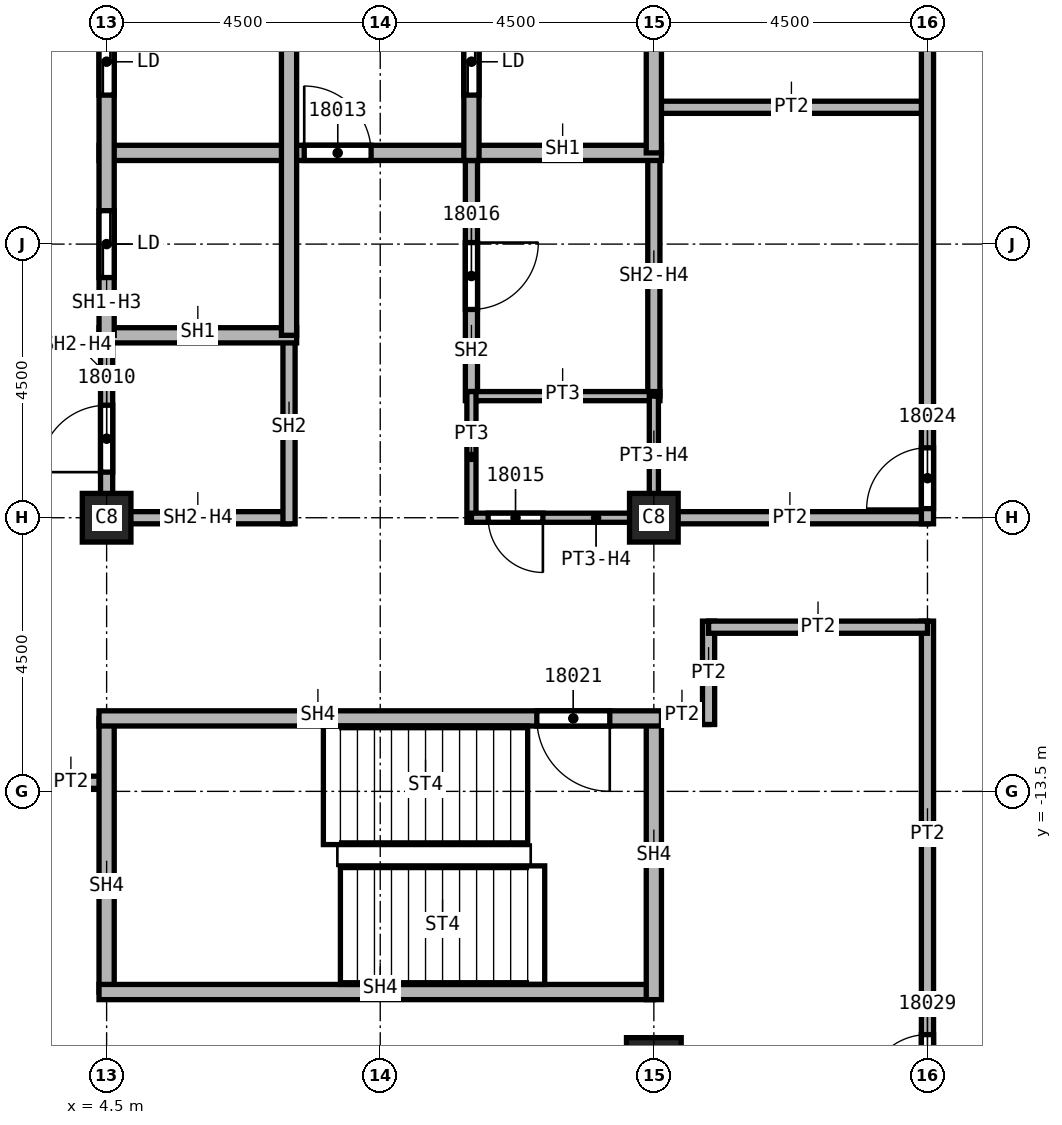
"""IFC4 building model, lengths in metres.
Left out: names, types, materials, properties, quantities, classifications, styles, units other than length and angle.
Written with IfcOpenShell. Run it as: python <this file> out.ifc"""

import sys

from ifc_helpers import new_model, si_unit, direction, frame, frame_2d, origin, origin_2d, place, context, subcontext, project, spatial, rectangle, extrude, element, fill, save


model = new_model("IFC4")
c1 = context("Model", 3, precision=1e-05, world=origin(), true_north=direction((0.0, 1.0)))
c2 = subcontext(c1, "Body", "Model", "MODEL_VIEW")
j1 = project(units=[si_unit("LENGTHUNIT", "METRE"), si_unit("PLANEANGLEUNIT", "RADIAN")], contexts=[c1])
p1 = place(None, origin())
s1 = spatial("IfcSite", under=j1, at=p1, CompositionType="ELEMENT")
p2 = place(p1, origin())
s2 = spatial("IfcBuilding", under=s1, at=p2, CompositionType="ELEMENT")
p3 = place(p2, frame((0.0, 0.0, 266.0)))
s3 = spatial("IfcBuildingStorey", under=s2, at=p3, CompositionType="ELEMENT", Elevation=266.0)
p4 = place(p3, frame((13.5, -18.0, 0.0), z_axis=(0.0, 0.0, 1.0), x_axis=(1.0, 0.0, 0.0)))
e1 = element("IfcColumn", 1, at=p4, inside=s3, PredefinedType="COLUMN", context=c2, shape_type="SweptSolid", body=[
    extrude(rectangle(XDim=0.9, YDim=0.9, at=origin_2d()), origin(), (0.0, 0.0, 1.0), 3.72),
])
for number, where, z_axis, x_axis in (
    (2, (4.5, -9.0, 0.0), (0.0, 0.0, 1.0), (1.0, 0.0, 0.0)),
    (3, (13.5, -9.0, 0.0), (0.0, 0.0, 1.0), (1.0, 0.0, 0.0)),
):
    element("IfcColumn", number, at=place(p3, frame(where, z_axis=z_axis, x_axis=x_axis)), inside=s3, PredefinedType="COLUMN", context=c2, shape_type="SweptSolid", body=[
        extrude(rectangle(XDim=0.8, YDim=0.8, at=origin_2d()), origin(), (0.0, 0.0, 1.0), 3.72),
    ])
p5 = place(p3, frame((4.5, -13.35, 0.0), z_axis=(0.0, 0.0, 1.0), x_axis=(-1.0, 0.0, 0.0)))
e4 = element("IfcWall", 4, at=p5, inside=s3, PredefinedType="PARTITIONING", context=c2, shape_type="SweptSolid", body=[
    extrude(rectangle(XDim=1.05, YDim=0.2, at=frame_2d((0.525, 0.0))), origin(), (0.0, 0.0, 1.0), 3.72),
])
for number, where, z_axis, x_axis in (
    (5, (13.5, -9.0, 0.0), (0.0, 0.0, 1.0), (1.0, 0.0, 0.0)),
    (6, (13.5, -2.25, 0.0), (0.0, 0.0, 1.0), (1.0, 0.0, 0.0)),
):
    element("IfcWall", number, at=place(p3, frame(where, z_axis=z_axis, x_axis=x_axis)), inside=s3, PredefinedType="PARTITIONING", context=c2, shape_type="SweptSolid", body=[
        extrude(rectangle(XDim=4.5, YDim=0.2, at=frame_2d((2.25, 0.0))), origin(), (0.0, 0.0, 1.0), 3.72),
    ])
p6 = place(p3, frame((14.4, -12.3, 0.0), z_axis=(0.0, 0.0, 1.0), x_axis=(-1.0, 0.0, 0.0)))
e7 = element("IfcWall", 7, at=p6, inside=s3, PredefinedType="PARTITIONING", context=c2, shape_type="SweptSolid", body=[
    extrude(rectangle(XDim=1.025, YDim=0.2, at=frame_2d((0.512, 0.0))), origin(), (0.0, 0.0, 1.0), 3.72),
])
p7 = place(p3, frame((14.4, -10.7, 0.0), z_axis=(0.0, 0.0, 1.0), x_axis=(0.0, -1.0, 0.0)))
e8 = element("IfcWall", 8, at=p7, inside=s3, PredefinedType="PARTITIONING", context=c2, shape_type="SweptSolid", body=[
    extrude(rectangle(XDim=1.7, YDim=0.2, at=frame_2d((0.85, 0.0))), origin(), (0.0, 0.0, 1.0), 3.72),
])
p8 = place(p3, frame((18.0, -21.9, 0.0), z_axis=(0.0, 0.0, 1.0), x_axis=(0.0, 1.0, 0.0)))
e9 = element("IfcWall", 9, at=p8, inside=s3, PredefinedType="PARTITIONING", context=c2, shape_type="SweptSolid", body=[
    extrude(rectangle(XDim=11.2, YDim=0.2, at=frame_2d((5.6, 0.0))), origin(), (0.0, 0.0, 1.0), 3.72),
])
p9 = place(p8, frame((3.4, 0.0, 0.0)))
e10 = element("IfcOpeningElement", 10, at=p9, cuts=e9, PredefinedType="OPENING", context=c2, shape_type="SweptSolid", body=[
    extrude(rectangle(XDim=1.0, YDim=2.1, at=frame_2d((0.5, 1.05))), frame((0.0, 0.1, 0.0), z_axis=(0.0, -1.0, 0.0), x_axis=(1.0, 0.0, 0.0)), (0.0, 0.0, 1.0), 0.2),
])
p10 = place(p3, frame((18.0, -10.8, 0.0), z_axis=(0.0, 0.0, 1.0), x_axis=(-1.0, 0.0, 0.0)))
e11 = element("IfcWall", 11, at=p10, inside=s3, PredefinedType="PARTITIONING", context=c2, shape_type="SweptSolid", body=[
    extrude(rectangle(XDim=3.6, YDim=0.2, at=frame_2d((1.8, 0.0))), origin(), (0.0, 0.0, 1.0), 3.72),
])
p11 = place(p3, frame((18.0, -9.1, 0.0), z_axis=(0.0, 0.0, 1.0), x_axis=(0.0, 1.0, 0.0)))
e12 = element("IfcWall", 12, at=p11, inside=s3, PredefinedType="PARTITIONING", context=c2, shape_type="SweptSolid", body=[
    extrude(rectangle(XDim=18.2, YDim=0.2, at=frame_2d((9.1, 0.0))), origin(), (0.0, 0.0, 1.0), 3.72),
])
p12 = place(p11, frame((0.25, 0.0, 0.0)))
e13 = element("IfcOpeningElement", 13, at=p12, cuts=e12, PredefinedType="OPENING", context=c2, shape_type="SweptSolid", body=[
    extrude(rectangle(XDim=1.0, YDim=2.1, at=frame_2d((0.5, 1.05))), frame((0.0, 0.1, 0.0), z_axis=(0.0, -1.0, 0.0), x_axis=(1.0, 0.0, 0.0)), (0.0, 0.0, 1.0), 0.2),
])
p13 = place(p11, frame((14.65, 0.0, 0.0)))
e14 = element("IfcOpeningElement", 14, at=p13, cuts=e12, PredefinedType="OPENING", context=c2, shape_type="SweptSolid", body=[
    extrude(rectangle(XDim=1.0, YDim=2.1, at=frame_2d((0.5, 1.05))), frame((0.0, 0.1, 0.0), z_axis=(0.0, -1.0, 0.0), x_axis=(1.0, 0.0, 0.0)), (0.0, 0.0, 1.0), 0.2),
])
p14 = place(p3, frame((4.5, -9.1, 0.0), z_axis=(0.0, 0.0, 1.0), x_axis=(0.0, 1.0, 0.0)))
e15 = element("IfcWall", 15, at=p14, inside=s3, PredefinedType="SOLIDWALL", context=c2, shape_type="SweptSolid", body=[
    extrude(rectangle(XDim=3.1, YDim=0.2, at=frame_2d((1.55, 0.0))), origin(), (0.0, 0.0, 1.0), 3.042),
])
p15 = place(p14, frame((0.85, 0.0, 0.0)))
e16 = element("IfcOpeningElement", 16, at=p15, cuts=e15, PredefinedType="OPENING", context=c2, shape_type="SweptSolid", body=[
    extrude(rectangle(XDim=1.1, YDim=2.1, at=frame_2d((0.55, 1.05))), frame((0.0, 0.1, 0.0), z_axis=(0.0, -1.0, 0.0), x_axis=(1.0, 0.0, 0.0)), (0.0, 0.0, 1.0), 0.2),
])
p16 = place(p3, frame((7.5, -9.0, 0.0), z_axis=(0.0, 0.0, 1.0), x_axis=(-1.0, 0.0, 0.0)))
e17 = element("IfcWall", 17, at=p16, inside=s3, PredefinedType="SOLIDWALL", context=c2, shape_type="SweptSolid", body=[
    extrude(rectangle(XDim=3.0, YDim=0.2, at=frame_2d((1.5, 0.0))), origin(), (0.0, 0.0, 1.0), 3.042),
])
p17 = place(p3, frame((7.5, -6.0, 0.0), z_axis=(0.0, 0.0, 1.0), x_axis=(0.0, -1.0, 0.0)))
e18 = element("IfcWall", 18, at=p17, inside=s3, PredefinedType="SOLIDWALL", context=c2, shape_type="SweptSolid", body=[
    extrude(rectangle(XDim=3.1, YDim=0.2, at=frame_2d((1.55, 0.0))), origin(), (0.0, 0.0, 1.0), 3.72),
])
p18 = place(p3, frame((10.5, -2.875, 0.0), z_axis=(0.0, 0.0, 1.0), x_axis=(0.0, -1.0, 0.0)))
e19 = element("IfcWall", 19, at=p18, inside=s3, PredefinedType="SOLIDWALL", context=c2, shape_type="SweptSolid", body=[
    extrude(rectangle(XDim=4.2, YDim=0.2, at=frame_2d((2.1, 0.0))), origin(), (0.0, 0.0, 1.0), 3.72),
])
p19 = place(p18, frame((1.6, 0.0, 0.0)))
e20 = element("IfcOpeningElement", 20, at=p19, cuts=e19, PredefinedType="OPENING", context=c2, shape_type="SweptSolid", body=[
    extrude(rectangle(XDim=1.1, YDim=2.1, at=frame_2d((0.55, 1.05))), frame((0.0, 0.1, 0.0), z_axis=(0.0, -1.0, 0.0), x_axis=(1.0, 0.0, 0.0)), (0.0, 0.0, 1.0), 0.2),
])
p20 = place(p3, frame((13.5, -3.0, 0.0), z_axis=(0.0, 0.0, 1.0), x_axis=(0.0, -1.0, 0.0)))
e21 = element("IfcWall", 21, at=p20, inside=s3, PredefinedType="SOLIDWALL", context=c2, shape_type="SweptSolid", body=[
    extrude(rectangle(XDim=4.0, YDim=0.2, at=frame_2d((2.0, 0.0))), origin(), (0.0, 0.0, 1.0), 3.042),
])
p21 = place(p3, frame((4.375, -6.0, 0.0), z_axis=(0.0, 0.0, 1.0), x_axis=(1.0, 0.0, 0.0)))
e22 = element("IfcWall", 22, at=p21, inside=s3, PredefinedType="SOLIDWALL", context=c2, shape_type="SweptSolid", body=[
    extrude(rectangle(XDim=3.25, YDim=0.25, at=frame_2d((1.625, 0.0))), origin(), (0.0, 0.0, 1.0), 3.72),
])
p22 = place(p3, frame((4.375, -3.0, 0.0), z_axis=(0.0, 0.0, 1.0), x_axis=(1.0, 0.0, 0.0)))
e23 = element("IfcWall", 23, at=p22, inside=s3, PredefinedType="SOLIDWALL", context=c2, shape_type="SweptSolid", body=[
    extrude(rectangle(XDim=9.25, YDim=0.25, at=frame_2d((4.625, 0.0))), origin(), (0.0, 0.0, 1.0), 3.72),
])
p23 = place(p22, frame((3.375, 0.0, 0.0)))
e24 = element("IfcOpeningElement", 24, at=p23, cuts=e23, PredefinedType="OPENING", context=c2, shape_type="SweptSolid", body=[
    extrude(rectangle(XDim=1.1, YDim=2.1, at=frame_2d((0.55, 1.05))), frame((0.0, 0.125, 0.0), z_axis=(0.0, -1.0, 0.0), x_axis=(1.0, 0.0, 0.0)), (0.0, 0.0, 1.0), 0.25),
])
p24 = place(p3, frame((4.5, -6.0, 0.0), z_axis=(0.0, 0.0, 1.0), x_axis=(0.0, 1.0, 0.0)))
e25 = element("IfcWall", 25, at=p24, inside=s3, PredefinedType="SOLIDWALL", context=c2, shape_type="SweptSolid", body=[
    extrude(rectangle(XDim=6.0, YDim=0.25, at=frame_2d((3.0, 0.0))), origin(), (0.0, 0.0, 1.0), 3.042),
])
p25 = place(p24, frame((0.95, 0.0, 0.0)))
e26 = element("IfcOpeningElement", 26, at=p25, cuts=e25, PredefinedType="OPENING", context=c2, shape_type="SweptSolid", body=[
    extrude(rectangle(XDim=1.1, YDim=2.1, at=frame_2d((0.55, 1.05))), frame((0.0, 0.125, 0.0), z_axis=(0.0, -1.0, 0.0), x_axis=(1.0, 0.0, 0.0)), (0.0, 0.0, 1.0), 0.25),
])
p26 = place(p24, frame((3.95, 0.0, 0.0)))
e27 = element("IfcOpeningElement", 27, at=p26, cuts=e25, PredefinedType="OPENING", context=c2, shape_type="SweptSolid", body=[
    extrude(rectangle(XDim=1.1, YDim=2.1, at=frame_2d((0.55, 1.05))), frame((0.0, 0.125, 0.0), z_axis=(0.0, -1.0, 0.0), x_axis=(1.0, 0.0, 0.0)), (0.0, 0.0, 1.0), 0.25),
])
p27 = place(p3, frame((7.5, 3.125, 0.0), z_axis=(0.0, 0.0, 1.0), x_axis=(0.0, -1.0, 0.0)))
e28 = element("IfcWall", 28, at=p27, inside=s3, PredefinedType="SOLIDWALL", context=c2, shape_type="SweptSolid", body=[
    extrude(rectangle(XDim=9.125, YDim=0.25, at=frame_2d((4.562, 0.0))), origin(), (0.0, 0.0, 1.0), 3.72),
])
p28 = place(p3, frame((10.5, 6.125, 0.0), z_axis=(0.0, 0.0, 1.0), x_axis=(0.0, -1.0, 0.0)))
e29 = element("IfcWall", 29, at=p28, inside=s3, PredefinedType="SOLIDWALL", context=c2, shape_type="SweptSolid", body=[
    extrude(rectangle(XDim=9.25, YDim=0.25, at=frame_2d((4.625, 0.0))), origin(), (0.0, 0.0, 1.0), 3.72),
])
p29 = place(p28, frame((7.075, 0.0, 0.0)))
e30 = element("IfcOpeningElement", 30, at=p29, cuts=e29, PredefinedType="OPENING", context=c2, shape_type="SweptSolid", body=[
    extrude(rectangle(XDim=1.1, YDim=2.1, at=frame_2d((0.55, 1.05))), frame((0.0, 0.125, 0.0), z_axis=(0.0, -1.0, 0.0), x_axis=(1.0, 0.0, 0.0)), (0.0, 0.0, 1.0), 0.25),
])
p30 = place(p28, frame((4.075, 0.0, 0.0)))
e31 = element("IfcOpeningElement", 31, at=p30, cuts=e29, PredefinedType="OPENING", context=c2, shape_type="SweptSolid", body=[
    extrude(rectangle(XDim=1.1, YDim=2.1, at=frame_2d((0.55, 1.05))), frame((0.0, 0.125, 0.0), z_axis=(0.0, -1.0, 0.0), x_axis=(1.0, 0.0, 0.0)), (0.0, 0.0, 1.0), 0.25),
])
p31 = place(p3, frame((13.5, 6.0, 0.0), z_axis=(0.0, 0.0, 1.0), x_axis=(0.0, -1.0, 0.0)))
e32 = element("IfcWall", 32, at=p31, inside=s3, PredefinedType="SOLIDWALL", context=c2, shape_type="SweptSolid", body=[
    extrude(rectangle(XDim=9.0, YDim=0.25, at=frame_2d((4.5, 0.0))), origin(), (0.0, 0.0, 1.0), 3.042),
])
p32 = place(p3, frame((4.5, -16.8, 0.0), z_axis=(0.0, 0.0, 1.0), x_axis=(0.0, 1.0, 0.0)))
e33 = element("IfcWall", 33, at=p32, inside=s3, PredefinedType="SOLIDWALL", context=c2, shape_type="SweptSolid", body=[
    extrude(rectangle(XDim=4.5, YDim=0.25, at=frame_2d((2.25, 0.0))), origin(), (0.0, 0.0, 1.0), 3.72),
])
p33 = place(p3, frame((13.5, -16.8, 0.0), z_axis=(0.0, 0.0, 1.0), x_axis=(-1.0, 0.0, 0.0)))
e34 = element("IfcWall", 34, at=p33, inside=s3, PredefinedType="SOLIDWALL", context=c2, shape_type="SweptSolid", body=[
    extrude(rectangle(XDim=9.125, YDim=0.25, at=frame_2d((4.562, 0.0))), origin(), (0.0, 0.0, 1.0), 3.72),
])
p34 = place(p3, frame((13.5, -12.3, 0.0), z_axis=(0.0, 0.0, 1.0), x_axis=(0.0, -1.0, 0.0)))
e35 = element("IfcWall", 35, at=p34, inside=s3, PredefinedType="SOLIDWALL", context=c2, shape_type="SweptSolid", body=[
    extrude(rectangle(XDim=4.625, YDim=0.25, at=frame_2d((2.312, 0.0))), origin(), (0.0, 0.0, 1.0), 3.72),
])
p35 = place(p3, frame((13.625, -12.3, 0.0), z_axis=(0.0, 0.0, 1.0), x_axis=(-1.0, 0.0, 0.0)))
e36 = element("IfcWall", 36, at=p35, inside=s3, PredefinedType="SOLIDWALL", context=c2, shape_type="SweptSolid", body=[
    extrude(rectangle(XDim=9.25, YDim=0.25, at=frame_2d((4.625, 0.0))), origin(), (0.0, 0.0, 1.0), 3.72),
])
p36 = place(p35, frame((0.85, 0.0, 0.0)))
e37 = element("IfcOpeningElement", 37, at=p36, cuts=e36, PredefinedType="OPENING", context=c2, shape_type="SweptSolid", body=[
    extrude(rectangle(XDim=1.2, YDim=2.1, at=frame_2d((0.6, 1.05))), frame((0.0, 0.125, 0.0), z_axis=(0.0, -1.0, 0.0), x_axis=(1.0, 0.0, 0.0)), (0.0, 0.0, 1.0), 0.25),
])
p37 = place(p3, frame((10.5, -7.0, 0.0), z_axis=(0.0, 0.0, 1.0), x_axis=(1.0, 0.0, 0.0)))
e38 = element("IfcWall", 38, at=p37, inside=s3, PredefinedType="PARTITIONING", context=c2, shape_type="SweptSolid", body=[
    extrude(rectangle(XDim=3.1, YDim=0.15, at=frame_2d((1.55, 0.0))), origin(), (0.0, 0.0, 1.0), 3.72),
])
p38 = place(p3, frame((10.5, -6.925, 0.0), z_axis=(0.0, 0.0, 1.0), x_axis=(0.0, -1.0, 0.0)))
e39 = element("IfcWall", 39, at=p38, inside=s3, PredefinedType="PARTITIONING", context=c2, shape_type="SweptSolid", body=[
    extrude(rectangle(XDim=2.15, YDim=0.15, at=frame_2d((1.075, 0.0))), origin(), (0.0, 0.0, 1.0), 3.72),
])
p39 = place(p3, frame((13.5, -7.0, 0.0), z_axis=(0.0, 0.0, 1.0), x_axis=(0.0, -1.0, 0.0)))
e40 = element("IfcWall", 40, at=p39, inside=s3, PredefinedType="PARTITIONING", context=c2, shape_type="SweptSolid", body=[
    extrude(rectangle(XDim=2.1, YDim=0.15, at=frame_2d((1.05, 0.0))), origin(), (0.0, 0.0, 1.0), 3.042),
])
p40 = place(p3, frame((13.575, -9.0, 0.0), z_axis=(0.0, 0.0, 1.0), x_axis=(-1.0, 0.0, 0.0)))
e41 = element("IfcWall", 41, at=p40, inside=s3, PredefinedType="PARTITIONING", context=c2, shape_type="SweptSolid", body=[
    extrude(rectangle(XDim=3.075, YDim=0.15, at=frame_2d((1.538, 0.0))), origin(), (0.0, 0.0, 1.0), 3.042),
])
p41 = place(p40, frame((1.9, 0.0, 0.0)))
e42 = element("IfcOpeningElement", 42, at=p41, cuts=e41, PredefinedType="OPENING", context=c2, shape_type="SweptSolid", body=[
    extrude(rectangle(XDim=0.9, YDim=2.1, at=frame_2d((0.45, 1.05))), frame((0.0, 0.075, 0.0), z_axis=(0.0, -1.0, 0.0), x_axis=(1.0, 0.0, 0.0)), (0.0, 0.0, 1.0), 0.15),
])
p42 = place(p15, origin())
e43 = element("IfcDoor", 43, at=p42, inside=s3, OperationType="SINGLE_SWING_LEFT", PredefinedType="DOOR", context=c2, shape_type="SweptSolid", body=[
    extrude(rectangle(XDim=1.1, YDim=2.1, at=frame_2d((0.55, 1.05))), frame((0.0, 0.025, 0.0), z_axis=(0.0, -1.0, 0.0), x_axis=(1.0, 0.0, 0.0)), (0.0, 0.0, 1.0), 0.05),
])
fill(e16, e43)
p43 = place(p23, origin())
e44 = element("IfcDoor", 44, at=p43, inside=s3, OperationType="SINGLE_SWING_RIGHT", PredefinedType="DOOR", context=c2, shape_type="SweptSolid", body=[
    extrude(rectangle(XDim=1.1, YDim=2.1, at=frame_2d((0.55, 1.05))), frame((0.0, 0.025, 0.0), z_axis=(0.0, -1.0, 0.0), x_axis=(1.0, 0.0, 0.0)), (0.0, 0.0, 1.0), 0.05),
])
fill(e24, e44)
p44 = place(p41, origin())
e45 = element("IfcDoor", 45, at=p44, inside=s3, OperationType="SINGLE_SWING_RIGHT", PredefinedType="DOOR", context=c2, shape_type="SweptSolid", body=[
    extrude(rectangle(XDim=0.9, YDim=2.1, at=frame_2d((0.45, 1.05))), frame((0.0, 0.025, 0.0), z_axis=(0.0, -1.0, 0.0), x_axis=(1.0, 0.0, 0.0)), (0.0, 0.0, 1.0), 0.05),
])
fill(e42, e45)
p45 = place(p19, origin())
e46 = element("IfcDoor", 46, at=p45, inside=s3, OperationType="SINGLE_SWING_LEFT", PredefinedType="DOOR", context=c2, shape_type="SweptSolid", body=[
    extrude(rectangle(XDim=1.1, YDim=2.1, at=frame_2d((0.55, 1.05))), frame((0.0, 0.025, 0.0), z_axis=(0.0, -1.0, 0.0), x_axis=(1.0, 0.0, 0.0)), (0.0, 0.0, 1.0), 0.05),
])
fill(e20, e46)
p46 = place(p36, origin())
e47 = element("IfcDoor", 47, at=p46, inside=s3, OperationType="SINGLE_SWING_RIGHT", PredefinedType="DOOR", context=c2, shape_type="SweptSolid", body=[
    extrude(rectangle(XDim=1.2, YDim=2.1, at=frame_2d((0.6, 1.05))), frame((0.0, 0.025, 0.0), z_axis=(0.0, -1.0, 0.0), x_axis=(1.0, 0.0, 0.0)), (0.0, 0.0, 1.0), 0.05),
])
fill(e37, e47)
p47 = place(p12, origin())
e48 = element("IfcDoor", 48, at=p47, inside=s3, OperationType="SINGLE_SWING_LEFT", PredefinedType="DOOR", context=c2, shape_type="SweptSolid", body=[
    extrude(rectangle(XDim=1.0, YDim=2.1, at=frame_2d((0.5, 1.05))), frame((0.0, 0.025, 0.0), z_axis=(0.0, -1.0, 0.0), x_axis=(1.0, 0.0, 0.0)), (0.0, 0.0, 1.0), 0.05),
])
fill(e13, e48)
p48 = place(p9, origin())
e49 = element("IfcDoor", 49, at=p48, inside=s3, OperationType="SINGLE_SWING_RIGHT", PredefinedType="DOOR", context=c2, shape_type="SweptSolid", body=[
    extrude(rectangle(XDim=1.0, YDim=2.1, at=frame_2d((0.5, 1.05))), frame((0.0, 0.025, 0.0), z_axis=(0.0, -1.0, 0.0), x_axis=(1.0, 0.0, 0.0)), (0.0, 0.0, 1.0), 0.05),
])
fill(e10, e49)
p49 = place(p25, origin())
e50 = element("IfcDoor", 50, at=p49, inside=s3, OperationType="SLIDING_TO_LEFT", PredefinedType="DOOR", context=c2, shape_type="SweptSolid", body=[
    extrude(rectangle(XDim=1.1, YDim=2.1, at=frame_2d((0.55, 1.05))), frame((0.0, 0.025, 0.0), z_axis=(0.0, -1.0, 0.0), x_axis=(1.0, 0.0, 0.0)), (0.0, 0.0, 1.0), 0.05),
])
fill(e26, e50)
p50 = place(p26, origin())
e51 = element("IfcDoor", 51, at=p50, inside=s3, OperationType="SLIDING_TO_LEFT", PredefinedType="DOOR", context=c2, shape_type="SweptSolid", body=[
    extrude(rectangle(XDim=1.1, YDim=2.1, at=frame_2d((0.55, 1.05))), frame((0.0, 0.025, 0.0), z_axis=(0.0, -1.0, 0.0), x_axis=(1.0, 0.0, 0.0)), (0.0, 0.0, 1.0), 0.05),
])
fill(e27, e51)
p51 = place(p29, origin())
e52 = element("IfcDoor", 52, at=p51, inside=s3, OperationType="SLIDING_TO_LEFT", PredefinedType="DOOR", context=c2, shape_type="SweptSolid", body=[
    extrude(rectangle(XDim=1.1, YDim=2.1, at=frame_2d((0.55, 1.05))), frame((0.0, 0.025, 0.0), z_axis=(0.0, -1.0, 0.0), x_axis=(1.0, 0.0, 0.0)), (0.0, 0.0, 1.0), 0.05),
])
fill(e30, e52)
save(model, sys.argv[1])
